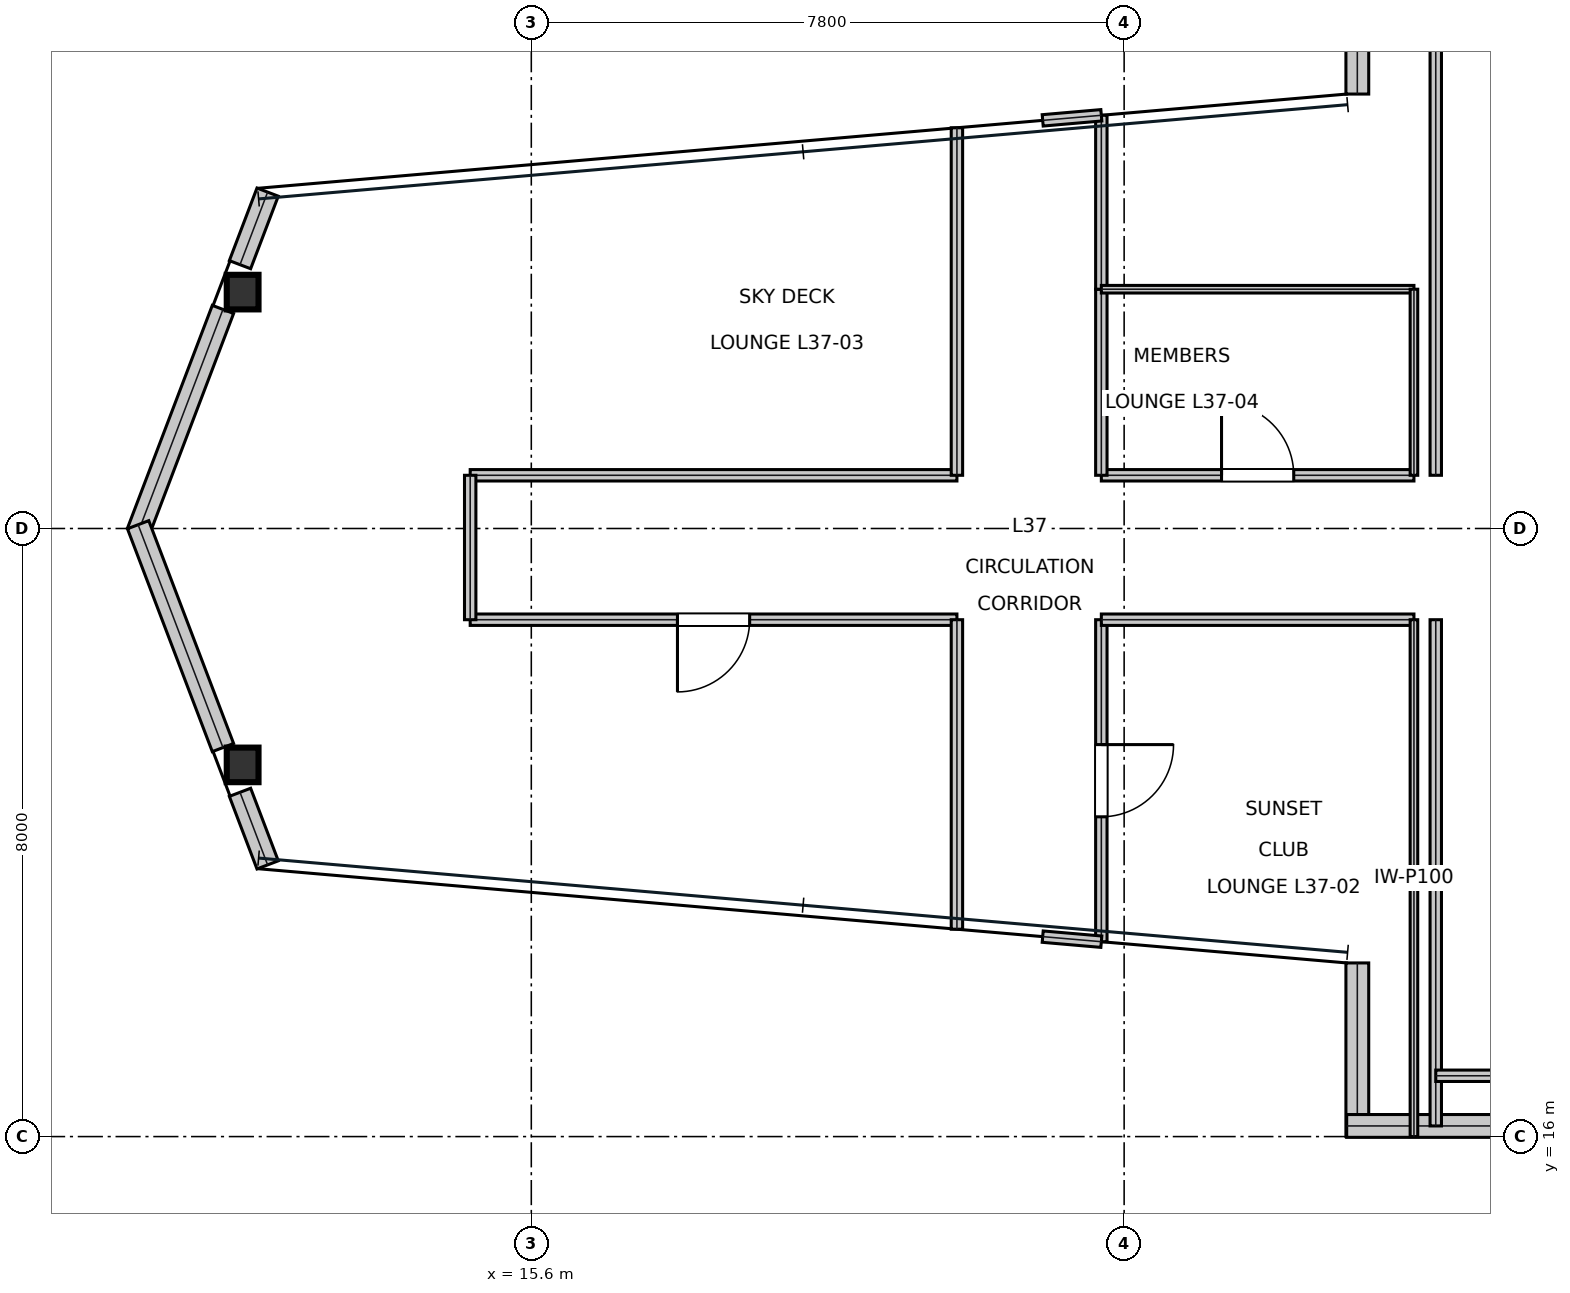
"""IFC4 building model, lengths in metres.
Left out: names, types, materials, properties, quantities, classifications, styles, units other than length and angle.
Written with IfcOpenShell. Run it as: python <this file> out.ifc"""

import sys

from ifc_helpers import new_model, si_unit, direction, frame, frame_2d, origin, origin_2d, place, context, subcontext, project, spatial, rectangle, i_section, extrude, element, fill, save


model = new_model("IFC4")
c1 = context("Model", 3, precision=1e-05, world=origin(), true_north=direction((0.0, 1.0)))
c2 = subcontext(c1, "Body", "Model", "MODEL_VIEW")
j1 = project(units=[si_unit("LENGTHUNIT", "METRE"), si_unit("PLANEANGLEUNIT", "RADIAN")], contexts=[c1])
p1 = place(None, origin())
s1 = spatial("IfcSite", under=j1, at=p1, CompositionType="ELEMENT")
p2 = place(p1, origin())
s2 = spatial("IfcBuilding", under=s1, at=p2, CompositionType="ELEMENT")
p3 = place(p2, frame((0.0, 0.0, 161.4)))
s3 = spatial("IfcBuildingStorey", under=s2, at=p3, CompositionType="ELEMENT", Elevation=161.4)
for number, where, z_axis, x_axis in (
    (1, (11.802, 20.89, 0.016), (0.017, 0.001, 1.0), (-0.074, 0.997, 0.0)),
    (2, (11.802, 27.11, 0.016), (0.017, -0.001, 1.0), (0.074, 0.997, 0.0)),
):
    element("IfcColumn", number, at=place(p3, frame(where, z_axis=z_axis, x_axis=x_axis)), inside=s3, PredefinedType="COLUMN", context=c2, shape_type="SweptSolid", body=[
        extrude(i_section(OverallWidth=0.418, OverallDepth=0.455, WebThickness=0.042, FlangeThickness=0.068, at=origin_2d()), origin(), (0.0, 0.0, 1.0), 4.019),
    ])
p4 = place(p3, frame((26.468, 32.0, 0.0), z_axis=(0.0, 0.0, 1.0), x_axis=(0.0, -1.0, 0.0)))
e3 = element("IfcWall", 3, at=p4, inside=s3, PredefinedType="STANDARD", context=c2, shape_type="SweptSolid", body=[
    extrude(rectangle(XDim=2.284, YDim=0.3, at=frame_2d((1.142, 0.0))), origin(), (0.0, 0.0, 1.0), 3.338),
])
p5 = place(p3, frame((12.131, 28.426, 0.0), z_axis=(0.0, 0.0, 1.0), x_axis=(-0.355806520877, -0.934559639457, 0.0)))
e4 = element("IfcWall", 4, at=p5, inside=s3, PredefinedType="STANDARD", context=c2, shape_type="SweptSolid", body=[
    extrude(rectangle(XDim=1.022, YDim=0.3, at=frame_2d((0.511, 0.0))), origin(), (0.0, 0.0, 1.0), 3.81),
])
for number, where, z_axis, x_axis in (
    (5, (11.543, 26.882, 0.0), (0.0, 0.0, 1.0), (-0.356, -0.935, 0.0)),
    (6, (10.427, 24.05, 0.0), (0.0, 0.0, 1.0), (0.356, -0.935, 0.0)),
):
    element("IfcWall", number, at=place(p3, frame(where, z_axis=z_axis, x_axis=x_axis)), inside=s3, PredefinedType="STANDARD", context=c2, shape_type="SweptSolid", body=[
        extrude(rectangle(XDim=3.137, YDim=0.3, at=frame_2d((1.569, 0.0))), origin(), (0.0, 0.0, 1.0), 3.81),
    ])
p6 = place(p3, frame((11.767, 20.529, 0.0), z_axis=(0.0, 0.0, 1.0), x_axis=(0.355806520877, -0.934559639457, 0.0)))
e7 = element("IfcWall", 7, at=p6, inside=s3, PredefinedType="STANDARD", context=c2, shape_type="SweptSolid", body=[
    extrude(rectangle(XDim=1.022, YDim=0.3, at=frame_2d((0.511, 0.0))), origin(), (0.0, 0.0, 1.0), 3.81),
])
p7 = place(p3, frame((26.468, 18.284, 0.0), z_axis=(0.0, 0.0, 1.0), x_axis=(0.0, -1.0, 0.0)))
e8 = element("IfcWall", 8, at=p7, inside=s3, PredefinedType="STANDARD", context=c2, shape_type="SweptSolid", body=[
    extrude(rectangle(XDim=2.284, YDim=0.3, at=frame_2d((1.142, 0.0))), origin(), (0.0, 0.0, 1.0), 3.338),
])
p8 = place(p3, frame((26.328, 16.14, 0.0), z_axis=(0.0, 0.0, 1.0), x_axis=(1.0, 0.0, 0.0)))
e9 = element("IfcWall", 9, at=p8, inside=s3, PredefinedType="STANDARD", context=c2, shape_type="SweptSolid", body=[
    extrude(rectangle(XDim=2.796, YDim=0.3, at=frame_2d((1.398, 0.0))), origin(), (0.0, 0.0, 1.0), 3.81),
])
p9 = place(p3, frame((23.1, 18.564, 0.0), z_axis=(0.0, 0.0, 1.0), x_axis=(0.0, 1.0, 0.0)))
e10 = element("IfcWall", 10, at=p9, inside=s3, PredefinedType="PARTITIONING", context=c2, shape_type="SweptSolid", body=[
    extrude(rectangle(XDim=4.236, YDim=0.15, at=frame_2d((2.118, 0.0))), origin(), (0.0, 0.0, 1.0), 3.19),
])
p10 = place(p9, frame((1.643, 0.0, 0.0)))
e11 = element("IfcOpeningElement", 11, at=p10, cuts=e10, PredefinedType="OPENING", context=c2, shape_type="SweptSolid", body=[
    extrude(rectangle(XDim=0.95, YDim=2.15, at=frame_2d((0.475, 1.075))), frame((0.0, 0.085, 0.0), z_axis=(0.0, -1.0, 0.0), x_axis=(1.0, 0.0, 0.0)), (0.0, 0.0, 1.0), 0.17),
])
p11 = place(p3, frame((14.796, 22.8, 0.0), z_axis=(0.0, 0.0, 1.0), x_axis=(1.0, 0.0, 0.0)))
e12 = element("IfcWall", 12, at=p11, inside=s3, PredefinedType="PARTITIONING", context=c2, shape_type="SweptSolid", body=[
    extrude(rectangle(XDim=6.404, YDim=0.15, at=frame_2d((3.202, 0.0))), origin(), (0.0, 0.0, 1.0), 3.443),
])
p12 = place(p11, frame((2.727, 0.0, 0.0)))
e13 = element("IfcOpeningElement", 13, at=p12, cuts=e12, PredefinedType="OPENING", context=c2, shape_type="SweptSolid", body=[
    extrude(rectangle(XDim=0.95, YDim=2.15, at=frame_2d((0.475, 1.075))), frame((0.0, 0.085, 0.0), z_axis=(0.0, -1.0, 0.0), x_axis=(1.0, 0.0, 0.0)), (0.0, 0.0, 1.0), 0.17),
])
p13 = place(p3, frame((23.1, 24.7, 0.0), z_axis=(0.0, 0.0, 1.0), x_axis=(1.0, 0.0, 0.0)))
e14 = element("IfcWall", 14, at=p13, inside=s3, PredefinedType="PARTITIONING", context=c2, shape_type="SweptSolid", body=[
    extrude(rectangle(XDim=4.113, YDim=0.15, at=frame_2d((2.056, 0.0))), origin(), (0.0, 0.0, 1.0), 3.19),
])
p14 = place(p13, frame((1.582, 0.0, 0.0)))
e15 = element("IfcOpeningElement", 15, at=p14, cuts=e14, PredefinedType="OPENING", context=c2, shape_type="SweptSolid", body=[
    extrude(rectangle(XDim=0.95, YDim=2.15, at=frame_2d((0.475, 1.075))), frame((0.0, 0.085, 0.0), z_axis=(0.0, -1.0, 0.0), x_axis=(1.0, 0.0, 0.0)), (0.0, 0.0, 1.0), 0.17),
])
p15 = place(p3, frame((27.5, 16.14, 0.0), z_axis=(0.0, 0.0, 1.0), x_axis=(0.0, 1.0, 0.0)))
e16 = element("IfcWall", 16, at=p15, inside=s3, PredefinedType="PARTITIONING", context=c2, shape_type="SweptSolid", body=[
    extrude(rectangle(XDim=6.66, YDim=0.15, at=frame_2d((3.33, 0.0))), origin(), (0.0, 0.0, 1.0), 3.338),
])
p16 = place(p3, frame((27.5, 16.8, 0.0), z_axis=(0.0, 0.0, 1.0), x_axis=(1.0, 0.0, 0.0)))
e17 = element("IfcWall", 17, at=p16, inside=s3, PredefinedType="PARTITIONING", context=c2, shape_type="SweptSolid", body=[
    extrude(rectangle(XDim=1.9, YDim=0.15, at=frame_2d((0.95, 0.0))), origin(), (0.0, 0.0, 1.0), 3.338),
])
p17 = place(p3, frame((23.1, 22.8, 0.0), z_axis=(0.0, 0.0, 1.0), x_axis=(1.0, 0.0, 0.0)))
e18 = element("IfcWall", 18, at=p17, inside=s3, PredefinedType="PARTITIONING", context=c2, shape_type="SweptSolid", body=[
    extrude(rectangle(XDim=4.113, YDim=0.15, at=frame_2d((2.056, 0.0))), origin(), (0.0, 0.0, 1.0), 3.19),
])
p18 = place(p3, frame((22.328, 18.631, 0.0), z_axis=(0.0, 0.0, 1.0), x_axis=(0.996264203876, -0.086357605777, 0.0)))
e19 = element("IfcWall", 19, at=p18, inside=s3, PredefinedType="PARTITIONING", context=c2, shape_type="SweptSolid", body=[
    extrude(rectangle(XDim=0.775, YDim=0.15, at=frame_2d((0.387, 0.0))), origin(), (0.0, 0.0, 1.0), 3.81),
])
p19 = place(p3, frame((14.796, 24.7, 0.0), z_axis=(0.0, 0.0, 1.0), x_axis=(1.0, 0.0, 0.0)))
e20 = element("IfcWall", 20, at=p19, inside=s3, PredefinedType="PARTITIONING", context=c2, shape_type="SweptSolid", body=[
    extrude(rectangle(XDim=6.404, YDim=0.15, at=frame_2d((3.202, 0.0))), origin(), (0.0, 0.0, 1.0), 3.443),
])
p20 = place(p3, frame((21.2, 24.7, 0.0), z_axis=(0.0, 0.0, 1.0), x_axis=(0.0, 1.0, 0.0)))
e21 = element("IfcWall", 21, at=p20, inside=s3, PredefinedType="PARTITIONING", context=c2, shape_type="SweptSolid", body=[
    extrude(rectangle(XDim=4.572, YDim=0.15, at=frame_2d((2.286, 0.0))), origin(), (0.0, 0.0, 1.0), 3.19),
])
p21 = place(p3, frame((21.2, 18.728, 0.0), z_axis=(0.0, 0.0, 1.0), x_axis=(0.0, 1.0, 0.0)))
e22 = element("IfcWall", 22, at=p21, inside=s3, PredefinedType="PARTITIONING", context=c2, shape_type="SweptSolid", body=[
    extrude(rectangle(XDim=4.072, YDim=0.15, at=frame_2d((2.036, 0.0))), origin(), (0.0, 0.0, 1.0), 3.19),
])
p22 = place(p3, frame((14.796, 22.8, 0.0), z_axis=(0.0, 0.0, 1.0), x_axis=(0.0, 1.0, 0.0)))
e23 = element("IfcWall", 23, at=p22, inside=s3, PredefinedType="PARTITIONING", context=c2, shape_type="SweptSolid", body=[
    extrude(rectangle(XDim=1.9, YDim=0.15, at=frame_2d((0.95, 0.0))), origin(), (0.0, 0.0, 1.0), 3.81),
])
p23 = place(p3, frame((23.1, 24.7, 0.0), z_axis=(0.0, 0.0, 1.0), x_axis=(0.0, 1.0, 0.0)))
e24 = element("IfcWall", 24, at=p23, inside=s3, PredefinedType="PARTITIONING", context=c2, shape_type="SweptSolid", body=[
    extrude(rectangle(XDim=2.448, YDim=0.15, at=frame_2d((1.224, 0.0))), origin(), (0.0, 0.0, 1.0), 3.19),
])
p24 = place(p3, frame((27.5, 24.7, 0.0), z_axis=(0.0, 0.0, 1.0), x_axis=(0.0, 1.0, 0.0)))
e25 = element("IfcWall", 25, at=p24, inside=s3, PredefinedType="PARTITIONING", context=c2, shape_type="SweptSolid", body=[
    extrude(rectangle(XDim=7.16, YDim=0.15, at=frame_2d((3.58, 0.0))), origin(), (0.0, 0.0, 1.0), 3.338),
])
p25 = place(p3, frame((23.1, 27.148, 0.0), z_axis=(0.0, 0.0, 1.0), x_axis=(0.0, 1.0, 0.0)))
e26 = element("IfcWall", 26, at=p25, inside=s3, PredefinedType="PARTITIONING", context=c2, shape_type="SweptSolid", body=[
    extrude(rectangle(XDim=2.288, YDim=0.15, at=frame_2d((1.144, 0.0))), origin(), (0.0, 0.0, 1.0), 3.81),
])
p26 = place(p3, frame((22.328, 29.369, 0.0), z_axis=(0.0, 0.0, 1.0), x_axis=(0.996264203876, 0.086357605777, 0.0)))
e27 = element("IfcWall", 27, at=p26, inside=s3, PredefinedType="PARTITIONING", context=c2, shape_type="SweptSolid", body=[
    extrude(rectangle(XDim=0.775, YDim=0.15, at=frame_2d((0.387, 0.0))), origin(), (0.0, 0.0, 1.0), 3.81),
])
p27 = place(p3, frame((27.213, 16.0, 0.0), z_axis=(0.0, 0.0, 1.0), x_axis=(0.0, 1.0, 0.0)))
e28 = element("IfcWall", 28, at=p27, inside=s3, PredefinedType="PARTITIONING", context=c2, shape_type="SweptSolid", body=[
    extrude(rectangle(XDim=6.8, YDim=0.1, at=frame_2d((3.4, 0.0))), origin(), (0.0, 0.0, 1.0), 3.338),
])
p28 = place(p3, frame((23.1, 27.148, 0.0), z_axis=(0.0, 0.0, 1.0), x_axis=(1.0, 0.0, 0.0)))
e29 = element("IfcWall", 29, at=p28, inside=s3, PredefinedType="PARTITIONING", context=c2, shape_type="SweptSolid", body=[
    extrude(rectangle(XDim=4.113, YDim=0.1, at=frame_2d((2.056, 0.0))), origin(), (0.0, 0.0, 1.0), 3.81),
])
p29 = place(p3, frame((27.213, 24.7, 0.0), z_axis=(0.0, 0.0, 1.0), x_axis=(0.0, 1.0, 0.0)))
e30 = element("IfcWall", 30, at=p29, inside=s3, PredefinedType="PARTITIONING", context=c2, shape_type="SweptSolid", body=[
    extrude(rectangle(XDim=2.448, YDim=0.1, at=frame_2d((1.224, 0.0))), origin(), (0.0, 0.0, 1.0), 3.81),
])
p30 = place(p10, frame((0.95, 0.0, 0.0), z_axis=(0.0, 0.0, 1.0), x_axis=(-1.0, 0.0, 0.0)))
e31 = element("IfcDoor", 31, at=p30, inside=s3, OperationType="SINGLE_SWING_LEFT", PredefinedType="DOOR", context=c2, shape_type="SweptSolid", body=[
    extrude(rectangle(XDim=0.95, YDim=2.15, at=frame_2d((0.475, 1.075))), frame((0.0, 0.025, 0.0), z_axis=(0.0, -1.0, 0.0), x_axis=(1.0, 0.0, 0.0)), (0.0, 0.0, 1.0), 0.05),
])
fill(e11, e31)
p31 = place(p12, frame((0.95, 0.0, 0.0), z_axis=(0.0, 0.0, 1.0), x_axis=(-1.0, 0.0, 0.0)))
e32 = element("IfcDoor", 32, at=p31, inside=s3, OperationType="SINGLE_SWING_RIGHT", PredefinedType="DOOR", context=c2, shape_type="SweptSolid", body=[
    extrude(rectangle(XDim=0.95, YDim=2.15, at=frame_2d((0.475, 1.075))), frame((0.0, 0.025, 0.0), z_axis=(0.0, -1.0, 0.0), x_axis=(1.0, 0.0, 0.0)), (0.0, 0.0, 1.0), 0.05),
])
fill(e13, e32)
p32 = place(p14, origin())
e33 = element("IfcDoor", 33, at=p32, inside=s3, OperationType="SINGLE_SWING_LEFT", PredefinedType="DOOR", context=c2, shape_type="SweptSolid", body=[
    extrude(rectangle(XDim=0.95, YDim=2.15, at=frame_2d((0.475, 1.075))), frame((0.0, 0.025, 0.0), z_axis=(0.0, -1.0, 0.0), x_axis=(1.0, 0.0, 0.0)), (0.0, 0.0, 1.0), 0.05),
])
fill(e15, e33)
save(model, sys.argv[1])
